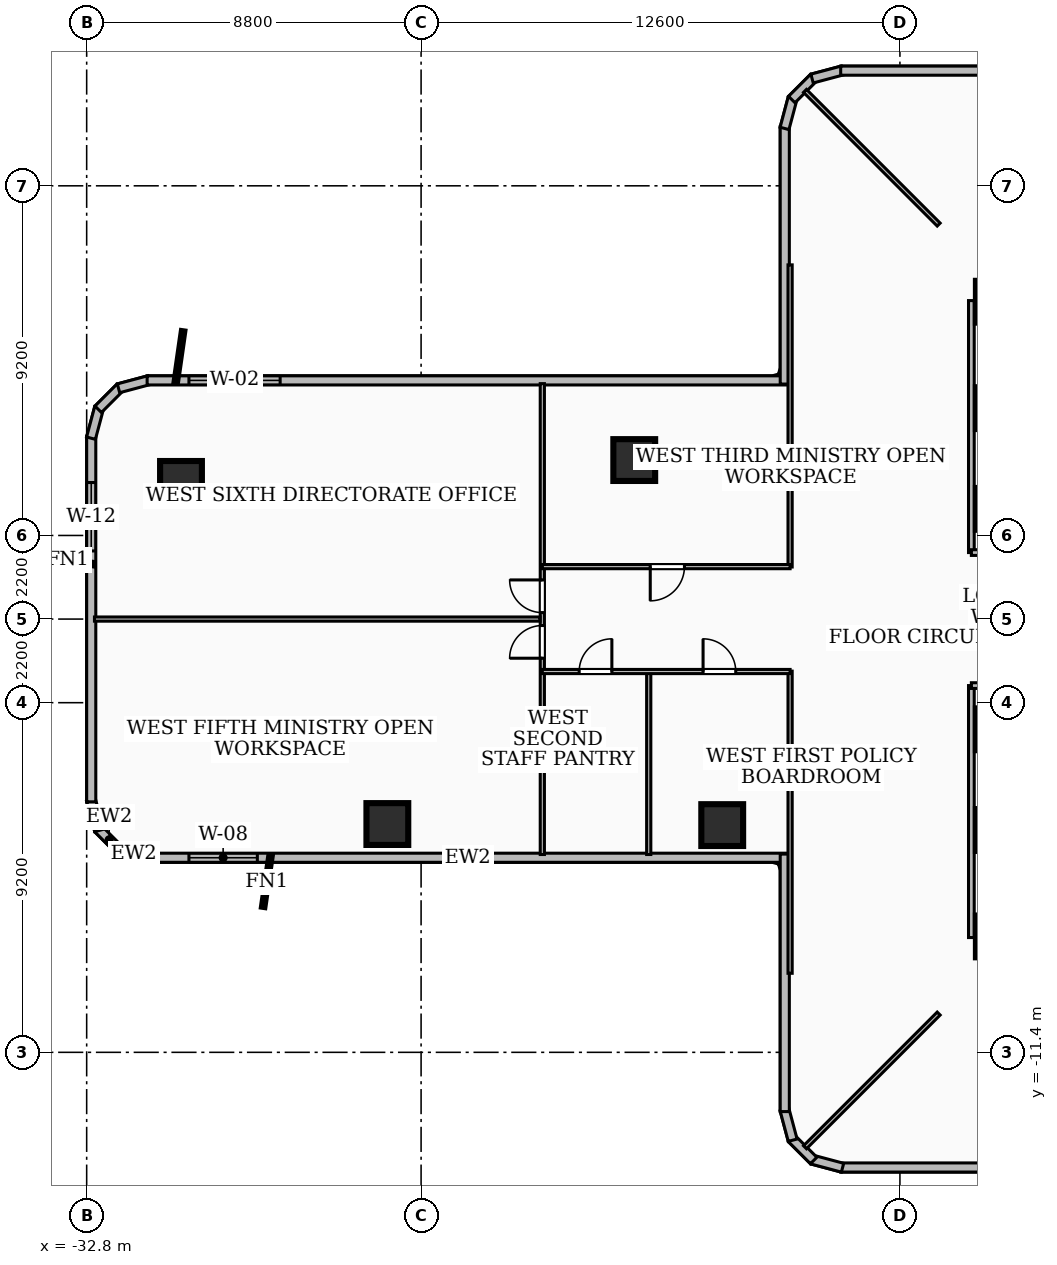
"""IFC4 building model, lengths in metres.
Left out: names, types, materials, properties, quantities, classifications, styles, units other than length and angle.
Written with IfcOpenShell. Run it as: python <this file> out.ifc"""

import sys

from ifc_helpers import new_model, si_unit, direction, frame, frame_2d, origin, origin_2d, place, context, subcontext, project, spatial, rectangle, extrude, element, fill, save


model = new_model("IFC4")
c1 = context("Model", 3, precision=1e-05, world=origin(), true_north=direction((0.0, 1.0)))
c2 = subcontext(c1, "Body", "Model", "MODEL_VIEW")
j1 = project(units=[si_unit("LENGTHUNIT", "METRE"), si_unit("PLANEANGLEUNIT", "RADIAN")], contexts=[c1])
p1 = place(None, origin())
s1 = spatial("IfcSite", under=j1, at=p1, CompositionType="ELEMENT")
p2 = place(p1, origin())
s2 = spatial("IfcBuilding", under=s1, at=p2, CompositionType="ELEMENT")
p3 = place(p2, frame((0.0, 0.0, 28.08)))
s3 = spatial("IfcBuildingStorey", under=s2, at=p3, CompositionType="ELEMENT", Elevation=28.08)
for number, where, z_axis, x_axis in (
    (1, (-8.85, -5.55, 0.0), (0.0, 0.0, 1.0), (1.0, 0.0, 0.0)),
    (2, (-8.85, -2.9, 0.0), (0.0, 0.0, 1.0), (1.0, 0.0, 0.0)),
    (3, (-8.85, 2.9, 0.0), (0.0, 0.0, 1.0), (1.0, 0.0, 0.0)),
    (4, (-8.85, 5.55, 0.0), (0.0, 0.0, 1.0), (1.0, 0.0, 0.0)),
    (5, (-8.85, 8.35, 0.0), (0.0, 0.0, 1.0), (1.0, 0.0, 0.0)),
    (6, (-8.85, -8.35, 0.0), (0.0, 0.0, 1.0), (1.0, 0.0, 0.0)),
    (7, (-18.391, 4.184, 0.0), (0.0, 0.0, 1.0), (1.0, 0.0, 0.0)),
    (8, (-16.076, -5.421, 0.0), (0.0, 0.0, 1.0), (1.0, 0.0, 0.0)),
    (9, (-30.318, 3.609, 0.0), (0.0, 0.0, 1.0), (1.0, 0.0, 0.0)),
    (10, (-24.888, -5.393, 0.0), (0.0, 0.0, 1.0), (1.0, 0.0, 0.0)),
):
    element("IfcColumn", number, at=place(p3, frame(where, z_axis=z_axis, x_axis=x_axis)), inside=s3, PredefinedType="COLUMN", context=c2, shape_type="SweptSolid", body=[
        extrude(rectangle(XDim=1.1, YDim=1.1, at=origin_2d()), origin(), (0.0, 0.0, 1.0), 3.6),
    ])
p4 = place(p3, frame((-14.334, -6.28, 0.0), z_axis=(0.0, 0.0, 1.0), x_axis=(-1.0, 0.0, 0.0)))
e11 = element("IfcWall", 11, at=p4, inside=s3, PredefinedType="SOLIDWALL", context=c2, shape_type="SweptSolid", body=[
    extrude(rectangle(XDim=16.875, YDim=0.24, at=frame_2d((8.438, 0.0))), origin(), (0.0, 0.0, 1.0), 3.34),
])
p5 = place(p4, frame((13.975, 0.0, 0.85)))
e12 = element("IfcOpeningElement", 12, at=p5, cuts=e11, PredefinedType="OPENING", context=c2, shape_type="SweptSolid", body=[
    extrude(rectangle(XDim=1.8, YDim=1.8, at=frame_2d((0.9, 0.9))), frame((0.0, 0.13, 0.0), z_axis=(0.0, -1.0, 0.0), x_axis=(1.0, 0.0, 0.0)), (0.0, 0.0, 1.0), 0.26),
])
p6 = place(p3, frame((-31.16, -6.286, 0.0), z_axis=(0.0, 0.0, 1.0), x_axis=(-0.966234939601, 0.25766265056, 0.0)))
e13 = element("IfcWall", 13, at=p6, inside=s3, PredefinedType="SOLIDWALL", context=c2, shape_type="SweptSolid", body=[
    extrude(rectangle(XDim=0.83, YDim=0.24, at=frame_2d((0.415, 0.0))), origin(), (0.0, 0.0, 1.0), 3.34),
])
p7 = place(p3, frame((-31.92, -6.096, 0.0), z_axis=(0.0, 0.0, 1.0), x_axis=(-0.707256607812, 0.706956922808, 0.0)))
e14 = element("IfcWall", 14, at=p7, inside=s3, PredefinedType="SOLIDWALL", context=c2, shape_type="SweptSolid", body=[
    extrude(rectangle(XDim=0.815, YDim=0.24, at=frame_2d((0.407, 0.0))), origin(), (0.0, 0.0, 1.0), 3.34),
])
p8 = place(p3, frame((-32.472, -5.562, 0.0), z_axis=(0.0, 0.0, 1.0), x_axis=(-0.257937227116, 0.966161677396, 0.0)))
e15 = element("IfcWall", 15, at=p8, inside=s3, PredefinedType="SOLIDWALL", context=c2, shape_type="SweptSolid", body=[
    extrude(rectangle(XDim=0.83, YDim=0.24, at=frame_2d((0.415, 0.0))), origin(), (0.0, 0.0, 1.0), 3.34),
])
p9 = place(p3, frame((-32.68, -4.809, 0.0), z_axis=(0.0, 0.0, 1.0), x_axis=(0.0, 1.0, 0.0)))
e16 = element("IfcWall", 16, at=p9, inside=s3, PredefinedType="SOLIDWALL", context=c2, shape_type="SweptSolid", body=[
    extrude(rectangle(XDim=9.618, YDim=0.24, at=frame_2d((4.809, 0.0))), origin(), (0.0, 0.0, 1.0), 3.34),
])
p10 = place(p9, frame((6.602, 0.0, 0.85)))
e17 = element("IfcOpeningElement", 17, at=p10, cuts=e16, PredefinedType="OPENING", context=c2, shape_type="SweptSolid", body=[
    extrude(rectangle(XDim=1.8, YDim=1.6, at=frame_2d((0.9, 0.8))), frame((0.0, 0.13, 0.0), z_axis=(0.0, -1.0, 0.0), x_axis=(1.0, 0.0, 0.0)), (0.0, 0.0, 1.0), 0.26),
])
p11 = place(p3, frame((-32.686, 4.76, 0.0), z_axis=(0.0, 0.0, 1.0), x_axis=(0.257937227116, 0.966161677396, 0.0)))
e18 = element("IfcWall", 18, at=p11, inside=s3, PredefinedType="SOLIDWALL", context=c2, shape_type="SweptSolid", body=[
    extrude(rectangle(XDim=0.83, YDim=0.24, at=frame_2d((0.415, 0.0))), origin(), (0.0, 0.0, 1.0), 3.34),
])
p12 = place(p3, frame((-32.496, 5.52, 0.0), z_axis=(0.0, 0.0, 1.0), x_axis=(0.707256607812, 0.706956922808, 0.0)))
e19 = element("IfcWall", 19, at=p12, inside=s3, PredefinedType="SOLIDWALL", context=c2, shape_type="SweptSolid", body=[
    extrude(rectangle(XDim=0.815, YDim=0.24, at=frame_2d((0.407, 0.0))), origin(), (0.0, 0.0, 1.0), 3.34),
])
p13 = place(p3, frame((-31.962, 6.072, 0.0), z_axis=(0.0, 0.0, 1.0), x_axis=(0.966234939601, 0.25766265056, 0.0)))
e20 = element("IfcWall", 20, at=p13, inside=s3, PredefinedType="SOLIDWALL", context=c2, shape_type="SweptSolid", body=[
    extrude(rectangle(XDim=0.83, YDim=0.24, at=frame_2d((0.415, 0.0))), origin(), (0.0, 0.0, 1.0), 3.34),
])
p14 = place(p3, frame((-31.209, 6.28, 0.0), z_axis=(0.0, 0.0, 1.0), x_axis=(1.0, 0.0, 0.0)))
e21 = element("IfcWall", 21, at=p14, inside=s3, PredefinedType="SOLIDWALL", context=c2, shape_type="SweptSolid", body=[
    extrude(rectangle(XDim=16.875, YDim=0.24, at=frame_2d((8.438, 0.0))), origin(), (0.0, 0.0, 1.0), 3.34),
])
p15 = place(p14, frame((1.1, 0.0, 0.85)))
e22 = element("IfcOpeningElement", 22, at=p15, cuts=e21, PredefinedType="OPENING", context=c2, shape_type="SweptSolid", body=[
    extrude(rectangle(XDim=2.4, YDim=2.1, at=frame_2d((1.2, 1.05))), frame((0.0, 0.13, 0.0), z_axis=(0.0, -1.0, 0.0), x_axis=(1.0, 0.0, 0.0)), (0.0, 0.0, 1.0), 0.26),
])
p16 = place(p3, frame((-14.43, 6.184, 0.0), z_axis=(0.0, 0.0, 1.0), x_axis=(0.0, 1.0, 0.0)))
e23 = element("IfcWall", 23, at=p16, inside=s3, PredefinedType="SOLIDWALL", context=c2, shape_type="SweptSolid", body=[
    extrude(rectangle(XDim=6.775, YDim=0.24, at=frame_2d((3.387, 0.0))), origin(), (0.0, 0.0, 1.0), 3.34),
])
p17 = place(p3, frame((-14.436, 12.91, 0.0), z_axis=(0.0, 0.0, 1.0), x_axis=(0.257937227116, 0.966161677396, 0.0)))
e24 = element("IfcWall", 24, at=p17, inside=s3, PredefinedType="SOLIDWALL", context=c2, shape_type="SweptSolid", body=[
    extrude(rectangle(XDim=0.83, YDim=0.24, at=frame_2d((0.415, 0.0))), origin(), (0.0, 0.0, 1.0), 3.34),
])
p18 = place(p3, frame((-14.246, 13.67, 0.0), z_axis=(0.0, 0.0, 1.0), x_axis=(0.707106781187, 0.707106781187, 0.0)))
e25 = element("IfcWall", 25, at=p18, inside=s3, PredefinedType="SOLIDWALL", context=c2, shape_type="SweptSolid", body=[
    extrude(rectangle(XDim=0.815, YDim=0.24, at=frame_2d((0.407, 0.0))), origin(), (0.0, 0.0, 1.0), 3.34),
])
p19 = place(p3, frame((-13.712, 14.222, 0.0), z_axis=(0.0, 0.0, 1.0), x_axis=(0.966161677396, 0.257937227116, 0.0)))
e26 = element("IfcWall", 26, at=p19, inside=s3, PredefinedType="SOLIDWALL", context=c2, shape_type="SweptSolid", body=[
    extrude(rectangle(XDim=0.83, YDim=0.24, at=frame_2d((0.415, 0.0))), origin(), (0.0, 0.0, 1.0), 3.34),
])
p20 = place(p3, frame((-12.959, 14.43, 0.0), z_axis=(0.0, 0.0, 1.0), x_axis=(1.0, 0.0, 0.0)))
e27 = element("IfcWall", 27, at=p20, inside=s3, PredefinedType="SOLIDWALL", context=c2, shape_type="SweptSolid", body=[
    extrude(rectangle(XDim=6.775, YDim=0.24, at=frame_2d((3.387, 0.0))), origin(), (0.0, 0.0, 1.0), 2.421),
])
p21 = place(p3, frame((-6.184, -14.43, 0.0), z_axis=(0.0, 0.0, 1.0), x_axis=(-1.0, 0.0, 0.0)))
e28 = element("IfcWall", 28, at=p21, inside=s3, PredefinedType="SOLIDWALL", context=c2, shape_type="SweptSolid", body=[
    extrude(rectangle(XDim=6.775, YDim=0.24, at=frame_2d((3.387, 0.0))), origin(), (0.0, 0.0, 1.0), 3.34),
])
p22 = place(p3, frame((-12.91, -14.436, 0.0), z_axis=(0.0, 0.0, 1.0), x_axis=(-0.966161677396, 0.257937227116, 0.0)))
e29 = element("IfcWall", 29, at=p22, inside=s3, PredefinedType="SOLIDWALL", context=c2, shape_type="SweptSolid", body=[
    extrude(rectangle(XDim=0.83, YDim=0.24, at=frame_2d((0.415, 0.0))), origin(), (0.0, 0.0, 1.0), 3.34),
])
p23 = place(p3, frame((-13.67, -14.246, 0.0), z_axis=(0.0, 0.0, 1.0), x_axis=(-0.707106781187, 0.707106781187, 0.0)))
e30 = element("IfcWall", 30, at=p23, inside=s3, PredefinedType="SOLIDWALL", context=c2, shape_type="SweptSolid", body=[
    extrude(rectangle(XDim=0.815, YDim=0.24, at=frame_2d((0.407, 0.0))), origin(), (0.0, 0.0, 1.0), 3.34),
])
p24 = place(p3, frame((-14.222, -13.712, 0.0), z_axis=(0.0, 0.0, 1.0), x_axis=(-0.257937227116, 0.966161677396, 0.0)))
e31 = element("IfcWall", 31, at=p24, inside=s3, PredefinedType="SOLIDWALL", context=c2, shape_type="SweptSolid", body=[
    extrude(rectangle(XDim=0.83, YDim=0.24, at=frame_2d((0.415, 0.0))), origin(), (0.0, 0.0, 1.0), 3.34),
])
p25 = place(p3, frame((-14.43, -12.959, 0.0), z_axis=(0.0, 0.0, 1.0), x_axis=(0.0, 1.0, 0.0)))
e32 = element("IfcWall", 32, at=p25, inside=s3, PredefinedType="SOLIDWALL", context=c2, shape_type="SweptSolid", body=[
    extrude(rectangle(XDim=6.775, YDim=0.24, at=frame_2d((3.387, 0.0))), origin(), (0.0, 0.0, 1.0), 3.34),
])
p26 = place(p3, frame((-9.52, 1.75, 0.0), z_axis=(0.0, 0.0, 1.0), x_axis=(0.0, 1.0, 0.0)))
e33 = element("IfcWall", 33, at=p26, inside=s3, PredefinedType="PARTITIONING", context=c2, shape_type="SweptSolid", body=[
    extrude(rectangle(XDim=6.63, YDim=0.15, at=frame_2d((3.315, 0.0))), origin(), (0.0, 0.0, 1.0), 2.421),
])
p27 = place(p3, frame((-7.85, 1.75, 0.0), z_axis=(0.0, 0.0, 1.0), x_axis=(-1.0, 0.0, 0.0)))
e34 = element("IfcWall", 34, at=p27, inside=s3, PredefinedType="PARTITIONING", context=c2, shape_type="SweptSolid", body=[
    extrude(rectangle(XDim=1.67, YDim=0.15, at=frame_2d((0.835, 0.0))), origin(), (0.0, 0.0, 1.0), 2.405),
])
p28 = place(p3, frame((-9.52, -8.38, 0.0), z_axis=(0.0, 0.0, 1.0), x_axis=(0.0, 1.0, 0.0)))
e35 = element("IfcWall", 35, at=p28, inside=s3, PredefinedType="PARTITIONING", context=c2, shape_type="SweptSolid", body=[
    extrude(rectangle(XDim=6.63, YDim=0.15, at=frame_2d((3.315, 0.0))), origin(), (0.0, 0.0, 1.0), 2.421),
])
p29 = place(p3, frame((-7.85, -1.75, 0.0), z_axis=(0.0, 0.0, 1.0), x_axis=(-1.0, 0.0, 0.0)))
e36 = element("IfcWall", 36, at=p29, inside=s3, PredefinedType="PARTITIONING", context=c2, shape_type="SweptSolid", body=[
    extrude(rectangle(XDim=1.67, YDim=0.15, at=frame_2d((0.835, 0.0))), origin(), (0.0, 0.0, 1.0), 2.405),
])
for number, where, z_axis, x_axis in (
    (37, (-10.38, 10.38, 0.0), (0.0, 0.0, 1.0), (-0.707, 0.707, 0.0)),
    (38, (-10.38, -10.38, 0.0), (0.0, 0.0, 1.0), (-0.707, -0.707, 0.0)),
):
    element("IfcWall", number, at=place(p3, frame(where, z_axis=z_axis, x_axis=x_axis)), inside=s3, PredefinedType="PARTITIONING", context=c2, shape_type="SweptSolid", body=[
        extrude(rectangle(XDim=4.975, YDim=0.11, at=frame_2d((2.488, 0.0))), origin(), (0.0, 0.0, 1.0), 3.34),
    ])
for number, where, z_axis, x_axis in (
    (39, (-14.29, -1.37, 0.0), (0.0, 0.0, 1.0), (0.0, -1.0, 0.0)),
    (40, (-14.29, 9.32, 0.0), (0.0, 0.0, 1.0), (0.0, -1.0, 0.0)),
):
    element("IfcWall", number, at=place(p3, frame(where, z_axis=z_axis, x_axis=x_axis)), inside=s3, PredefinedType="PARTITIONING", context=c2, shape_type="SweptSolid", body=[
        extrude(rectangle(XDim=7.95, YDim=0.11, at=frame_2d((3.975, 0.0))), origin(), (0.0, 0.0, 1.0), 2.421),
    ])
p30 = place(p3, frame((-18.01, -1.4, 0.0), z_axis=(0.0, 0.0, 1.0), x_axis=(0.0, -1.0, 0.0)))
e41 = element("IfcWall", 41, at=p30, inside=s3, PredefinedType="PARTITIONING", context=c2, shape_type="SweptSolid", body=[
    extrude(rectangle(XDim=4.795, YDim=0.11, at=frame_2d((2.397, 0.0))), origin(), (0.0, 0.0, 1.0), 2.421),
])
p31 = place(p3, frame((-20.81, -1.38, 0.0), z_axis=(0.0, 0.0, 1.0), x_axis=(1.0, 0.0, 0.0)))
e42 = element("IfcWall", 42, at=p31, inside=s3, PredefinedType="PARTITIONING", context=c2, shape_type="SweptSolid", body=[
    extrude(rectangle(XDim=6.52, YDim=0.11, at=frame_2d((3.26, 0.0))), origin(), (0.0, 0.0, 1.0), 2.869),
])
p32 = place(p31, frame((4.23, 0.0, 0.0)))
e43 = element("IfcOpeningElement", 43, at=p32, cuts=e42, PredefinedType="OPENING", context=c2, shape_type="SweptSolid", body=[
    extrude(rectangle(XDim=0.86, YDim=2.04, at=frame_2d((0.43, 1.02))), frame((0.0, 0.065, 0.0), z_axis=(0.0, -1.0, 0.0), x_axis=(1.0, 0.0, 0.0)), (0.0, 0.0, 1.0), 0.13),
])
p33 = place(p31, frame((0.97, 0.0, 0.0)))
e44 = element("IfcOpeningElement", 44, at=p33, cuts=e42, PredefinedType="OPENING", context=c2, shape_type="SweptSolid", body=[
    extrude(rectangle(XDim=0.86, YDim=2.04, at=frame_2d((0.43, 1.02))), frame((0.0, 0.065, 0.0), z_axis=(0.0, -1.0, 0.0), x_axis=(1.0, 0.0, 0.0)), (0.0, 0.0, 1.0), 0.13),
])
p34 = place(p3, frame((-14.29, 1.38, 0.0), z_axis=(0.0, 0.0, 1.0), x_axis=(-1.0, 0.0, 0.0)))
e45 = element("IfcWall", 45, at=p34, inside=s3, PredefinedType="PARTITIONING", context=c2, shape_type="SweptSolid", body=[
    extrude(rectangle(XDim=6.52, YDim=0.11, at=frame_2d((3.26, 0.0))), origin(), (0.0, 0.0, 1.0), 2.869),
])
p35 = place(p34, frame((2.78, 0.0, 0.0)))
e46 = element("IfcOpeningElement", 46, at=p35, cuts=e45, PredefinedType="OPENING", context=c2, shape_type="SweptSolid", body=[
    extrude(rectangle(XDim=0.9, YDim=2.06, at=frame_2d((0.45, 1.03))), frame((0.0, 0.065, 0.0), z_axis=(0.0, -1.0, 0.0), x_axis=(1.0, 0.0, 0.0)), (0.0, 0.0, 1.0), 0.13),
])
p36 = place(p3, frame((-20.87, 0.0, 0.0), z_axis=(0.0, 0.0, 1.0), x_axis=(-1.0, 0.0, 0.0)))
e47 = element("IfcWall", 47, at=p36, inside=s3, PredefinedType="PARTITIONING", context=c2, shape_type="SweptSolid", body=[
    extrude(rectangle(XDim=11.725, YDim=0.11, at=frame_2d((5.862, 0.0))), origin(), (0.0, 0.0, 1.0), 2.72),
])
p37 = place(p3, frame((-20.81, -6.195, 0.0), z_axis=(0.0, 0.0, 1.0), x_axis=(0.0, 1.0, 0.0)))
e48 = element("IfcWall", 48, at=p37, inside=s3, PredefinedType="PARTITIONING", context=c2, shape_type="SweptSolid", body=[
    extrude(rectangle(XDim=12.39, YDim=0.11, at=frame_2d((6.195, 0.0))), origin(), (0.0, 0.0, 1.0), 2.421),
])
p38 = place(p37, frame((6.365, 0.0, 0.0)))
e49 = element("IfcOpeningElement", 49, at=p38, cuts=e48, PredefinedType="OPENING", context=c2, shape_type="SweptSolid", body=[
    extrude(rectangle(XDim=0.86, YDim=2.04, at=frame_2d((0.43, 1.02))), frame((0.0, 0.065, 0.0), z_axis=(0.0, -1.0, 0.0), x_axis=(1.0, 0.0, 0.0)), (0.0, 0.0, 1.0), 0.13),
])
p39 = place(p37, frame((5.165, 0.0, 0.0)))
e50 = element("IfcOpeningElement", 50, at=p39, cuts=e48, PredefinedType="OPENING", context=c2, shape_type="SweptSolid", body=[
    extrude(rectangle(XDim=0.86, YDim=2.04, at=frame_2d((0.43, 1.02))), frame((0.0, 0.065, 0.0), z_axis=(0.0, -1.0, 0.0), x_axis=(1.0, 0.0, 0.0)), (0.0, 0.0, 1.0), 0.13),
])
p40 = place(p5, origin())
e51 = element("IfcWindow", 51, at=p40, inside=s3, PartitioningType="SINGLE_PANEL", PredefinedType="WINDOW", context=c2, shape_type="SweptSolid", body=[
    extrude(rectangle(XDim=1.8, YDim=1.8, at=frame_2d((0.9, 0.9))), frame((0.0, 0.03, 0.0), z_axis=(0.0, -1.0, 0.0), x_axis=(1.0, 0.0, 0.0)), (0.0, 0.0, 1.0), 0.06),
])
fill(e12, e51)
p41 = place(p10, origin())
e52 = element("IfcWindow", 52, at=p41, inside=s3, PartitioningType="SINGLE_PANEL", PredefinedType="WINDOW", context=c2, shape_type="SweptSolid", body=[
    extrude(rectangle(XDim=1.8, YDim=1.6, at=frame_2d((0.9, 0.8))), frame((0.0, 0.03, 0.0), z_axis=(0.0, -1.0, 0.0), x_axis=(1.0, 0.0, 0.0)), (0.0, 0.0, 1.0), 0.06),
])
fill(e17, e52)
p42 = place(p15, origin())
e53 = element("IfcWindow", 53, at=p42, inside=s3, PartitioningType="SINGLE_PANEL", PredefinedType="WINDOW", context=c2, shape_type="SweptSolid", body=[
    extrude(rectangle(XDim=2.4, YDim=2.1, at=frame_2d((1.2, 1.05))), frame((0.0, 0.03, 0.0), z_axis=(0.0, -1.0, 0.0), x_axis=(1.0, 0.0, 0.0)), (0.0, 0.0, 1.0), 0.06),
])
fill(e22, e53)
p43 = place(p32, origin())
e54 = element("IfcDoor", 54, at=p43, inside=s3, OperationType="SINGLE_SWING_LEFT", PredefinedType="DOOR", context=c2, shape_type="SweptSolid", body=[
    extrude(rectangle(XDim=0.86, YDim=2.04, at=frame_2d((0.43, 1.02))), frame((0.0, 0.025, 0.0), z_axis=(0.0, -1.0, 0.0), x_axis=(1.0, 0.0, 0.0)), (0.0, 0.0, 1.0), 0.05),
])
fill(e43, e54)
p44 = place(p33, origin())
e55 = element("IfcDoor", 55, at=p44, inside=s3, OperationType="SINGLE_SWING_RIGHT", PredefinedType="DOOR", context=c2, shape_type="SweptSolid", body=[
    extrude(rectangle(XDim=0.86, YDim=2.04, at=frame_2d((0.43, 1.02))), frame((0.0, 0.025, 0.0), z_axis=(0.0, -1.0, 0.0), x_axis=(1.0, 0.0, 0.0)), (0.0, 0.0, 1.0), 0.05),
])
fill(e44, e55)
p45 = place(p35, origin())
e56 = element("IfcDoor", 56, at=p45, inside=s3, OperationType="SINGLE_SWING_RIGHT", PredefinedType="DOOR", context=c2, shape_type="SweptSolid", body=[
    extrude(rectangle(XDim=0.9, YDim=2.06, at=frame_2d((0.45, 1.03))), frame((0.0, 0.025, 0.0), z_axis=(0.0, -1.0, 0.0), x_axis=(1.0, 0.0, 0.0)), (0.0, 0.0, 1.0), 0.05),
])
fill(e46, e56)
p46 = place(p38, origin())
e57 = element("IfcDoor", 57, at=p46, inside=s3, OperationType="SINGLE_SWING_RIGHT", PredefinedType="DOOR", context=c2, shape_type="SweptSolid", body=[
    extrude(rectangle(XDim=0.86, YDim=2.04, at=frame_2d((0.43, 1.02))), frame((0.0, 0.025, 0.0), z_axis=(0.0, -1.0, 0.0), x_axis=(1.0, 0.0, 0.0)), (0.0, 0.0, 1.0), 0.05),
])
fill(e49, e57)
p47 = place(p39, origin())
e58 = element("IfcDoor", 58, at=p47, inside=s3, OperationType="SINGLE_SWING_LEFT", PredefinedType="DOOR", context=c2, shape_type="SweptSolid", body=[
    extrude(rectangle(XDim=0.86, YDim=2.04, at=frame_2d((0.43, 1.02))), frame((0.0, 0.025, 0.0), z_axis=(0.0, -1.0, 0.0), x_axis=(1.0, 0.0, 0.0)), (0.0, 0.0, 1.0), 0.05),
])
fill(e50, e58)
save(model, sys.argv[1])
